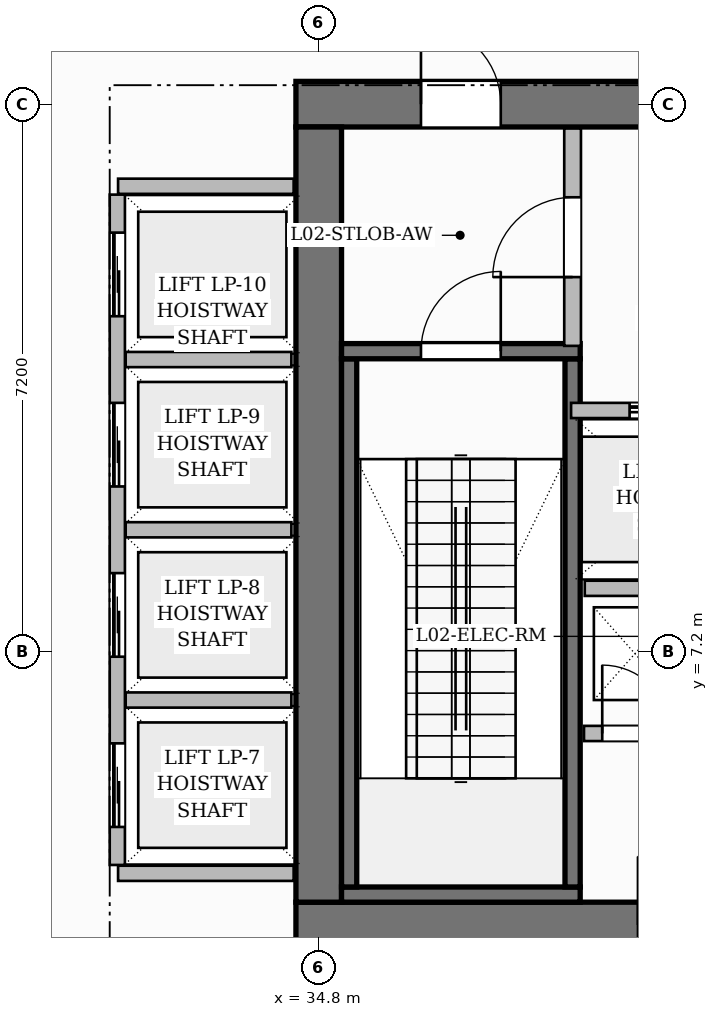
"""IFC4 building model, lengths in metres.
Left out: names, types, materials, properties, quantities, classifications, styles, units other than length and angle.
Written with IfcOpenShell. Run it as: python <this file> out.ifc"""

import sys

from ifc_helpers import new_model, si_unit, direction, frame, frame_2d, origin, place, context, subcontext, project, spatial, rectangle, extrude, source, transform, mapped, element, fill, save


model = new_model("IFC4")
c1 = context("Model", 3, precision=1e-05, world=origin(), true_north=direction((0.0, 1.0)))
c2 = subcontext(c1, "Body", "Model", "MODEL_VIEW")
j1 = project(units=[si_unit("LENGTHUNIT", "METRE"), si_unit("PLANEANGLEUNIT", "RADIAN")], contexts=[c1])
p1 = place(None, origin())
s1 = spatial("IfcSite", under=j1, at=p1, CompositionType="ELEMENT")
p2 = place(p1, origin())
s2 = spatial("IfcBuilding", under=s1, at=p2, CompositionType="ELEMENT")
p3 = place(p2, frame((0.0, 0.0, 10.8)))
s3 = spatial("IfcBuildingStorey", under=s2, at=p3, CompositionType="ELEMENT", Elevation=10.8)
p4 = place(p3, frame((34.5, 3.6, 0.0), z_axis=(0.0, 0.0, 1.0), x_axis=(1.0, 0.0, 0.0)))
e1 = element("IfcWall", 1, at=p4, inside=s3, PredefinedType="SHEAR", context=c2, shape_type="SweptSolid", body=[
    extrude(rectangle(XDim=15.6, YDim=0.6, at=frame_2d((7.8, 0.0))), origin(), (0.0, 0.0, 1.0), 5.4),
])
p5 = place(p4, frame((4.5, 0.0, 0.0)))
e2 = element("IfcOpeningElement", 2, at=p5, cuts=e1, PredefinedType="OPENING", context=c2, shape_type="SweptSolid", body=[
    extrude(rectangle(XDim=0.9, YDim=2.1, at=frame_2d((0.45, 1.05))), frame((0.0, 0.31, 0.0), z_axis=(0.0, -1.0, 0.0), x_axis=(1.0, 0.0, 0.0)), (0.0, 0.0, 1.0), 0.62),
])
p6 = place(p4, frame((6.95, 0.0, 0.0)))
e3 = element("IfcOpeningElement", 3, at=p6, cuts=e1, PredefinedType="OPENING", context=c2, shape_type="SweptSolid", body=[
    extrude(rectangle(XDim=0.9, YDim=2.1, at=frame_2d((0.45, 1.05))), frame((0.0, 0.31, 0.0), z_axis=(0.0, -1.0, 0.0), x_axis=(1.0, 0.0, 0.0)), (0.0, 0.0, 1.0), 0.62),
])
p7 = place(p3, frame((34.5, 14.4, 0.0), z_axis=(0.0, 0.0, 1.0), x_axis=(1.0, 0.0, 0.0)))
e4 = element("IfcWall", 4, at=p7, inside=s3, PredefinedType="SHEAR", context=c2, shape_type="SweptSolid", body=[
    extrude(rectangle(XDim=15.6, YDim=0.6, at=frame_2d((7.8, 0.0))), origin(), (0.0, 0.0, 1.0), 5.4),
])
p8 = place(p7, frame((5.43, 0.0, 0.0)))
e5 = element("IfcOpeningElement", 5, at=p8, cuts=e4, PredefinedType="OPENING", context=c2, shape_type="SweptSolid", body=[
    extrude(rectangle(XDim=1.5, YDim=2.2, at=frame_2d((0.75, 1.1))), frame((0.0, 0.31, 0.0), z_axis=(0.0, -1.0, 0.0), x_axis=(1.0, 0.0, 0.0)), (0.0, 0.0, 1.0), 0.62),
])
p9 = place(p7, frame((1.645, 0.0, 0.0)))
e6 = element("IfcOpeningElement", 6, at=p9, cuts=e4, PredefinedType="OPENING", context=c2, shape_type="SweptSolid", body=[
    extrude(rectangle(XDim=1.05, YDim=2.15, at=frame_2d((0.525, 1.075))), frame((0.0, 0.31, 0.0), z_axis=(0.0, -1.0, 0.0), x_axis=(1.0, 0.0, 0.0)), (0.0, 0.0, 1.0), 0.62),
])
p10 = place(p7, frame((11.275, 0.0, 0.0)))
e7 = element("IfcOpeningElement", 7, at=p10, cuts=e4, PredefinedType="OPENING", context=c2, shape_type="SweptSolid", body=[
    extrude(rectangle(XDim=1.05, YDim=2.15, at=frame_2d((0.525, 1.075))), frame((0.0, 0.31, 0.0), z_axis=(0.0, -1.0, 0.0), x_axis=(1.0, 0.0, 0.0)), (0.0, 0.0, 1.0), 0.62),
])
p11 = place(p3, frame((34.8, 3.9, 0.0), z_axis=(0.0, 0.0, 1.0), x_axis=(0.0, 1.0, 0.0)))
e8 = element("IfcWall", 8, at=p11, inside=s3, PredefinedType="SHEAR", context=c2, shape_type="SweptSolid", body=[
    extrude(rectangle(XDim=10.2, YDim=0.6, at=frame_2d((5.1, 0.0))), origin(), (0.0, 0.0, 1.0), 5.4),
])
p12 = place(p3, frame((35.1, 4.0, 0.0), z_axis=(0.0, 0.0, 1.0), x_axis=(1.0, 0.0, 0.0)))
e9 = element("IfcWall", 9, at=p12, inside=s3, PredefinedType="SHEAR", context=c2, shape_type="SweptSolid", body=[
    extrude(rectangle(XDim=3.14, YDim=0.2, at=frame_2d((1.57, 0.0))), origin(), (0.0, 0.0, 1.0), 5.4),
])
for number, where, z_axis, x_axis in (
    (10, (35.2, 4.1, 0.0), (0.0, 0.0, 1.0), (0.0, 1.0, 0.0)),
    (11, (38.14, 4.1, 0.0), (0.0, 0.0, 1.0), (0.0, 1.0, 0.0)),
):
    element("IfcWall", number, at=place(p3, frame(where, z_axis=z_axis, x_axis=x_axis)), inside=s3, PredefinedType="SHEAR", context=c2, shape_type="SweptSolid", body=[
        extrude(rectangle(XDim=6.95, YDim=0.2, at=frame_2d((3.475, 0.0))), origin(), (0.0, 0.0, 1.0), 5.4),
    ])
p13 = place(p3, frame((35.1, 11.15, 0.0), z_axis=(0.0, 0.0, 1.0), x_axis=(1.0, 0.0, 0.0)))
e12 = element("IfcWall", 12, at=p13, inside=s3, PredefinedType="SHEAR", context=c2, shape_type="SweptSolid", body=[
    extrude(rectangle(XDim=3.14, YDim=0.2, at=frame_2d((1.57, 0.0))), origin(), (0.0, 0.0, 1.0), 5.4),
])
p14 = place(p13, frame((1.045, 0.0, 0.0)))
e13 = element("IfcOpeningElement", 13, at=p14, cuts=e12, PredefinedType="OPENING", context=c2, shape_type="SweptSolid", body=[
    extrude(rectangle(XDim=1.05, YDim=2.2, at=frame_2d((0.525, 1.1))), frame((0.0, 0.11, 0.0), z_axis=(0.0, -1.0, 0.0), x_axis=(1.0, 0.0, 0.0)), (0.0, 0.0, 1.0), 0.22),
])
p15 = place(p3, frame((38.3, 8.03, 0.0), z_axis=(0.0, 0.0, 1.0), x_axis=(1.0, 0.0, 0.0)))
e14 = element("IfcWall", 14, at=p15, inside=s3, PredefinedType="PARTITIONING", context=c2, shape_type="SweptSolid", body=[
    extrude(rectangle(XDim=4.74, YDim=0.2, at=frame_2d((2.37, 0.0))), origin(), (0.0, 0.0, 1.0), 5.1),
])
p16 = place(p3, frame((38.14, 11.22, 0.0), z_axis=(0.0, 0.0, 1.0), x_axis=(0.0, 1.0, 0.0)))
e15 = element("IfcWall", 15, at=p16, inside=s3, PredefinedType="PARTITIONING", context=c2, shape_type="SweptSolid", body=[
    extrude(rectangle(XDim=2.86, YDim=0.22, at=frame_2d((1.43, 0.0))), origin(), (0.0, 0.0, 1.0), 5.1),
])
p17 = place(p16, frame((0.905, 0.0, 0.0)))
e16 = element("IfcOpeningElement", 16, at=p17, cuts=e15, PredefinedType="OPENING", context=c2, shape_type="SweptSolid", body=[
    extrude(rectangle(XDim=1.05, YDim=2.15, at=frame_2d((0.525, 1.075))), frame((0.0, 0.12, 0.0), z_axis=(0.0, -1.0, 0.0), x_axis=(1.0, 0.0, 0.0)), (0.0, 0.0, 1.0), 0.24),
])
p18 = place(p3, frame((38.29, 6.12, 0.0), z_axis=(0.0, 0.0, 1.0), x_axis=(1.0, 0.0, 0.0)))
e17 = element("IfcWall", 17, at=p18, inside=s3, PredefinedType="PARTITIONING", context=c2, shape_type="SweptSolid", body=[
    extrude(rectangle(XDim=1.38, YDim=0.2, at=frame_2d((0.69, 0.0))), origin(), (0.0, 0.0, 1.0), 5.1),
])
p19 = place(p18, frame((0.24, 0.0, 0.0)))
e18 = element("IfcOpeningElement", 18, at=p19, cuts=e17, PredefinedType="OPENING", context=c2, shape_type="SweptSolid", body=[
    extrude(rectangle(XDim=0.9, YDim=2.1, at=frame_2d((0.45, 1.05))), frame((0.0, 0.11, 0.0), z_axis=(0.0, -1.0, 0.0), x_axis=(1.0, 0.0, 0.0)), (0.0, 0.0, 1.0), 0.22),
])
for number, where, z_axis, x_axis in (
    (19, (32.16, 4.28, 0.0), (0.0, 0.0, 1.0), (1.0, 0.0, 0.0)),
    (20, (32.16, 13.32, 0.0), (0.0, 0.0, 1.0), (1.0, 0.0, 0.0)),
):
    element("IfcWall", number, at=place(p3, frame(where, z_axis=z_axis, x_axis=x_axis)), inside=s3, PredefinedType="PARTITIONING", context=c2, shape_type="SweptSolid", body=[
        extrude(rectangle(XDim=2.31, YDim=0.2, at=frame_2d((1.155, 0.0))), origin(), (0.0, 0.0, 1.0), 5.1),
    ])
p20 = place(p3, frame((32.15, 4.39, 0.0), z_axis=(0.0, 0.0, 1.0), x_axis=(0.0, 1.0, 0.0)))
e21 = element("IfcWall", 21, at=p20, inside=s3, PredefinedType="PARTITIONING", context=c2, shape_type="SweptSolid", body=[
    extrude(rectangle(XDim=8.82, YDim=0.2, at=frame_2d((4.41, 0.0))), origin(), (0.0, 0.0, 1.0), 5.1),
])
p21 = place(p20, frame((0.5, 0.0, 0.0)))
e22 = element("IfcOpeningElement", 22, at=p21, cuts=e21, PredefinedType="OPENING", context=c2, shape_type="SweptSolid", body=[
    extrude(rectangle(XDim=1.1, YDim=2.2, at=frame_2d((0.55, 1.1))), frame((0.0, 0.11, 0.0), z_axis=(0.0, -1.0, 0.0), x_axis=(1.0, 0.0, 0.0)), (0.0, 0.0, 1.0), 0.22),
])
p22 = place(p20, frame((2.74, 0.0, 0.0)))
e23 = element("IfcOpeningElement", 23, at=p22, cuts=e21, PredefinedType="OPENING", context=c2, shape_type="SweptSolid", body=[
    extrude(rectangle(XDim=1.1, YDim=2.2, at=frame_2d((0.55, 1.1))), frame((0.0, 0.11, 0.0), z_axis=(0.0, -1.0, 0.0), x_axis=(1.0, 0.0, 0.0)), (0.0, 0.0, 1.0), 0.22),
])
p23 = place(p20, frame((4.98, 0.0, 0.0)))
e24 = element("IfcOpeningElement", 24, at=p23, cuts=e21, PredefinedType="OPENING", context=c2, shape_type="SweptSolid", body=[
    extrude(rectangle(XDim=1.1, YDim=2.2, at=frame_2d((0.55, 1.1))), frame((0.0, 0.11, 0.0), z_axis=(0.0, -1.0, 0.0), x_axis=(1.0, 0.0, 0.0)), (0.0, 0.0, 1.0), 0.22),
])
p24 = place(p20, frame((7.22, 0.0, 0.0)))
e25 = element("IfcOpeningElement", 25, at=p24, cuts=e21, PredefinedType="OPENING", context=c2, shape_type="SweptSolid", body=[
    extrude(rectangle(XDim=1.1, YDim=2.2, at=frame_2d((0.55, 1.1))), frame((0.0, 0.11, 0.0), z_axis=(0.0, -1.0, 0.0), x_axis=(1.0, 0.0, 0.0)), (0.0, 0.0, 1.0), 0.22),
])
for number, where, z_axis, x_axis in (
    (26, (32.26, 6.56, 0.0), (0.0, 0.0, 1.0), (1.0, 0.0, 0.0)),
    (27, (32.26, 8.8, 0.0), (0.0, 0.0, 1.0), (1.0, 0.0, 0.0)),
    (28, (32.26, 11.04, 0.0), (0.0, 0.0, 1.0), (1.0, 0.0, 0.0)),
):
    element("IfcWall", number, at=place(p3, frame(where, z_axis=z_axis, x_axis=x_axis)), inside=s3, PredefinedType="PARTITIONING", context=c2, shape_type="SweptSolid", body=[
        extrude(rectangle(XDim=2.18, YDim=0.2, at=frame_2d((1.09, 0.0))), origin(), (0.0, 0.0, 1.0), 5.1),
    ])
p25 = place(p3, frame((38.12, 10.37, 0.0), z_axis=(0.0, 0.0, 1.0), x_axis=(1.0, 0.0, 0.0)))
e29 = element("IfcWall", 29, at=p25, inside=s3, PredefinedType="PARTITIONING", context=c2, shape_type="SweptSolid", body=[
    extrude(rectangle(XDim=2.64, YDim=0.2, at=frame_2d((1.32, 0.0))), origin(), (0.0, 0.0, 1.0), 5.1),
])
p26 = place(p25, frame((0.77, 0.0, 0.0)))
e30 = element("IfcOpeningElement", 30, at=p26, cuts=e29, PredefinedType="OPENING", context=c2, shape_type="SweptSolid", body=[
    extrude(rectangle(XDim=1.1, YDim=2.2, at=frame_2d((0.55, 1.1))), frame((0.0, 0.11, 0.0), z_axis=(0.0, -1.0, 0.0), x_axis=(1.0, 0.0, 0.0)), (0.0, 0.0, 1.0), 0.22),
])
m1 = source(origin(), c2, "Body", "SweptSolid", [
    extrude(rectangle(XDim=1.05, YDim=2.2, at=frame_2d((0.525, 1.1))), frame((0.0, 0.025, 0.0), z_axis=(0.0, -1.0, 0.0), x_axis=(1.0, 0.0, 0.0)), (0.0, 0.0, 1.0), 0.05),
])
p27 = place(p14, origin())
e31 = element("IfcDoor", 31, at=p27, inside=s3, OperationType="SINGLE_SWING_RIGHT", PredefinedType="DOOR", context=c2, shape_type="MappedRepresentation", body=[
    mapped(m1, transform((0.0, 0.0, 0.0), scale=1.0)),
])
fill(e13, e31)
m2 = source(origin(), c2, "Body", "SweptSolid", [
    extrude(rectangle(XDim=1.05, YDim=2.15, at=frame_2d((0.525, 1.075))), frame((0.0, 0.025, 0.0), z_axis=(0.0, -1.0, 0.0), x_axis=(1.0, 0.0, 0.0)), (0.0, 0.0, 1.0), 0.05),
])
p28 = place(p17, origin())
e32 = element("IfcDoor", 32, at=p28, inside=s3, OperationType="SINGLE_SWING_LEFT", PredefinedType="DOOR", context=c2, shape_type="MappedRepresentation", body=[
    mapped(m2, transform((0.0, 0.0, 0.0), scale=1.0)),
])
fill(e16, e32)
p29 = place(p9, origin())
e33 = element("IfcDoor", 33, at=p29, inside=s3, OperationType="SINGLE_SWING_LEFT", PredefinedType="DOOR", context=c2, shape_type="MappedRepresentation", body=[
    mapped(m2, transform((0.0, 0.0, 0.0), scale=1.0)),
])
fill(e6, e33)
m3 = source(origin(), c2, "Body", "SweptSolid", [
    extrude(rectangle(XDim=0.9, YDim=2.1, at=frame_2d((0.45, 1.05))), frame((0.0, 0.025, 0.0), z_axis=(0.0, -1.0, 0.0), x_axis=(1.0, 0.0, 0.0)), (0.0, 0.0, 1.0), 0.05),
])
p30 = place(p19, origin())
e34 = element("IfcDoor", 34, at=p30, inside=s3, OperationType="SINGLE_SWING_LEFT", PredefinedType="DOOR", context=c2, shape_type="MappedRepresentation", body=[
    mapped(m3, transform((0.0, 0.0, 0.0), scale=1.0)),
])
fill(e18, e34)
m4 = source(origin(), c2, "Body", "SweptSolid", [
    extrude(rectangle(XDim=1.1, YDim=2.2, at=frame_2d((0.55, 1.1))), frame((0.0, 0.025, 0.0), z_axis=(0.0, -1.0, 0.0), x_axis=(1.0, 0.0, 0.0)), (0.0, 0.0, 1.0), 0.05),
])
p31 = place(p26, origin())
e35 = element("IfcDoor", 35, at=p31, inside=s3, OperationType="SLIDING_TO_LEFT", PredefinedType="DOOR", context=c2, shape_type="MappedRepresentation", body=[
    mapped(m4, transform((0.0, 0.0, 0.0), scale=1.0)),
])
fill(e30, e35)
p32 = place(p21, origin())
e36 = element("IfcDoor", 36, at=p32, inside=s3, OperationType="SLIDING_TO_LEFT", PredefinedType="DOOR", context=c2, shape_type="MappedRepresentation", body=[
    mapped(m4, transform((0.0, 0.0, 0.0), scale=1.0)),
])
fill(e22, e36)
p33 = place(p22, origin())
e37 = element("IfcDoor", 37, at=p33, inside=s3, OperationType="SLIDING_TO_LEFT", PredefinedType="DOOR", context=c2, shape_type="MappedRepresentation", body=[
    mapped(m4, transform((0.0, 0.0, 0.0), scale=1.0)),
])
fill(e23, e37)
p34 = place(p23, origin())
e38 = element("IfcDoor", 38, at=p34, inside=s3, OperationType="SLIDING_TO_LEFT", PredefinedType="DOOR", context=c2, shape_type="MappedRepresentation", body=[
    mapped(m4, transform((0.0, 0.0, 0.0), scale=1.0)),
])
fill(e24, e38)
p35 = place(p24, origin())
e39 = element("IfcDoor", 39, at=p35, inside=s3, OperationType="SLIDING_TO_LEFT", PredefinedType="DOOR", context=c2, shape_type="MappedRepresentation", body=[
    mapped(m4, transform((0.0, 0.0, 0.0), scale=1.0)),
])
fill(e25, e39)
save(model, sys.argv[1])
